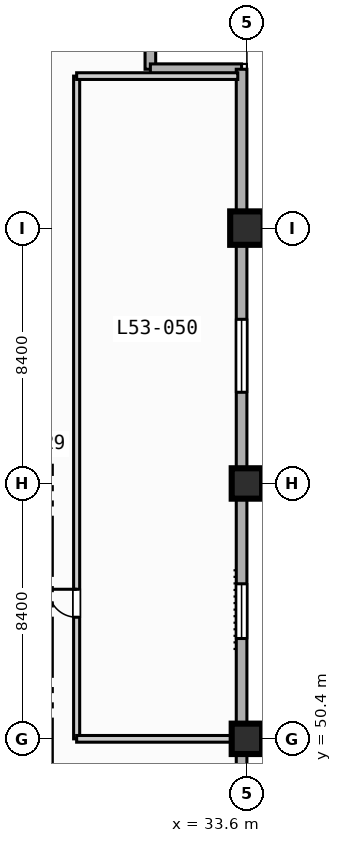
"""IFC4 building model, lengths in metres.
Left out: names, types, materials, properties, quantities, classifications, styles, units other than length and angle.
Written with IfcOpenShell. Run it as: python <this file> out.ifc"""

import sys

from ifc_helpers import new_model, si_unit, direction, frame, frame_2d, origin, origin_2d, place, context, subcontext, project, spatial, rectangle, extrude, element, fill, save


model = new_model("IFC4")
c1 = context("Model", 3, precision=1e-05, world=origin(), true_north=direction((0.0, 1.0)))
c2 = subcontext(c1, "Body", "Model", "MODEL_VIEW")
j1 = project(units=[si_unit("LENGTHUNIT", "METRE"), si_unit("PLANEANGLEUNIT", "RADIAN")], contexts=[c1])
p1 = place(None, origin())
s1 = spatial("IfcSite", under=j1, at=p1, CompositionType="ELEMENT")
p2 = place(p1, origin())
s2 = spatial("IfcBuilding", under=s1, at=p2, CompositionType="ELEMENT")
p3 = place(p2, frame((0.0, 0.0, 216.1)))
s3 = spatial("IfcBuildingStorey", under=s2, at=p3, CompositionType="ELEMENT", Elevation=216.1)
for number, where, z_axis, x_axis in (
    (1, (33.6, 50.4, 0.0), (0.0, 0.0, 1.0), (1.0, 0.0, 0.0)),
    (2, (33.6, 58.8, 0.0), (0.0, 0.0, 1.0), (1.0, 0.0, 0.0)),
):
    element("IfcColumn", number, at=place(p3, frame(where, z_axis=z_axis, x_axis=x_axis)), inside=s3, PredefinedType="COLUMN", context=c2, shape_type="SweptSolid", body=[
        extrude(rectangle(XDim=1.0, YDim=1.0, at=origin_2d()), origin(), (0.0, 0.0, 1.0), 3.7),
    ])
p4 = place(p3, frame((33.6, 67.2, 0.0), z_axis=(0.0, 0.0, 1.0), x_axis=(1.0, 0.0, 0.0)))
e3 = element("IfcColumn", 3, at=p4, inside=s3, PredefinedType="COLUMN", context=c2, shape_type="SweptSolid", body=[
    extrude(rectangle(XDim=1.1, YDim=1.1, at=origin_2d()), origin(), (0.0, 0.0, 1.0), 3.7),
])
for number, where, z_axis, x_axis in (
    (4, (30.425, 75.425, 0.0), (0.0, 0.0, 1.0), (0.0, -1.0, 0.0)),
    (5, (30.425, 72.425, 0.0), (0.0, 0.0, 1.0), (1.0, 0.0, 0.0)),
):
    element("IfcWall", number, at=place(p3, frame(where, z_axis=z_axis, x_axis=x_axis)), inside=s3, PredefinedType="STANDARD", context=c2, shape_type="SweptSolid", body=[
        extrude(rectangle(XDim=3.0, YDim=0.35, at=frame_2d((1.5, 0.0))), origin(), (0.0, 0.0, 1.0), 3.47),
    ])
p5 = place(p3, frame((33.425, 72.425, 0.0), z_axis=(0.0, 0.0, 1.0), x_axis=(0.0, -1.0, 0.0)))
e6 = element("IfcWall", 6, at=p5, inside=s3, PredefinedType="STANDARD", context=c2, shape_type="SweptSolid", body=[
    extrude(rectangle(XDim=39.0, YDim=0.35, at=frame_2d((19.5, 0.0))), origin(), (0.0, 0.0, 1.0), 3.47),
])
p6 = place(p5, frame((33.725, 0.0, 0.85)))
e7 = element("IfcOpeningElement", 7, at=p6, cuts=e6, PredefinedType="OPENING", context=c2, shape_type="SweptSolid", body=[
    extrude(rectangle(XDim=1.8, YDim=1.8, at=frame_2d((0.9, 0.9))), frame((0.0, 0.185, 0.0), z_axis=(0.0, -1.0, 0.0), x_axis=(1.0, 0.0, 0.0)), (0.0, 0.0, 1.0), 0.37),
])
p7 = place(p5, frame((16.925, 0.0, 0.85)))
e8 = element("IfcOpeningElement", 8, at=p7, cuts=e6, PredefinedType="OPENING", context=c2, shape_type="SweptSolid", body=[
    extrude(rectangle(XDim=1.8, YDim=1.8, at=frame_2d((0.9, 0.9))), frame((0.0, 0.185, 0.0), z_axis=(0.0, -1.0, 0.0), x_axis=(1.0, 0.0, 0.0)), (0.0, 0.0, 1.0), 0.37),
])
p8 = place(p5, frame((8.225, 0.0, 0.85)))
e9 = element("IfcOpeningElement", 9, at=p8, cuts=e6, PredefinedType="OPENING", context=c2, shape_type="SweptSolid", body=[
    extrude(rectangle(XDim=2.4, YDim=1.95, at=frame_2d((1.2, 0.975))), frame((0.0, 0.185, 0.0), z_axis=(0.0, -1.0, 0.0), x_axis=(1.0, 0.0, 0.0)), (0.0, 0.0, 1.0), 0.37),
])
p9 = place(p3, frame((28.0, 50.4, 0.0), z_axis=(0.0, 0.0, 1.0), x_axis=(0.0, 1.0, 0.0)))
e10 = element("IfcWall", 10, at=p9, inside=s3, PredefinedType="PARTITIONING", context=c2, shape_type="SweptSolid", body=[
    extrude(rectangle(XDim=21.8, YDim=0.2, at=frame_2d((10.9, 0.0))), origin(), (0.0, 0.0, 1.0), 3.47),
])
p10 = place(p9, frame((4.0, 0.0, 0.0)))
e11 = element("IfcOpeningElement", 11, at=p10, cuts=e10, PredefinedType="OPENING", context=c2, shape_type="SweptSolid", body=[
    extrude(rectangle(XDim=0.92, YDim=2.1, at=frame_2d((0.46, 1.05))), frame((0.0, 0.11, 0.0), z_axis=(0.0, -1.0, 0.0), x_axis=(1.0, 0.0, 0.0)), (0.0, 0.0, 1.0), 0.22),
])
p11 = place(p3, frame((28.0, 50.4, 0.0), z_axis=(0.0, 0.0, 1.0), x_axis=(1.0, 0.0, 0.0)))
e12 = element("IfcWall", 12, at=p11, inside=s3, PredefinedType="PARTITIONING", context=c2, shape_type="SweptSolid", body=[
    extrude(rectangle(XDim=5.3, YDim=0.22, at=frame_2d((2.65, 0.0))), origin(), (0.0, 0.0, 1.0), 2.82),
])
p12 = place(p3, frame((28.0, 72.2, 0.0), z_axis=(0.0, 0.0, 1.0), x_axis=(1.0, 0.0, 0.0)))
e13 = element("IfcWall", 13, at=p12, inside=s3, PredefinedType="PARTITIONING", context=c2, shape_type="SweptSolid", body=[
    extrude(rectangle(XDim=5.3, YDim=0.22, at=frame_2d((2.65, 0.0))), origin(), (0.0, 0.0, 1.0), 3.47),
])
p13 = place(p7, origin())
e14 = element("IfcWindow", 14, at=p13, inside=s3, PartitioningType="SINGLE_PANEL", PredefinedType="WINDOW", context=c2, shape_type="SweptSolid", body=[
    extrude(rectangle(XDim=1.8, YDim=1.8, at=frame_2d((0.9, 0.9))), frame((0.0, 0.03, 0.0), z_axis=(0.0, -1.0, 0.0), x_axis=(1.0, 0.0, 0.0)), (0.0, 0.0, 1.0), 0.06),
])
fill(e8, e14)
p14 = place(p8, origin())
e15 = element("IfcWindow", 15, at=p14, inside=s3, PartitioningType="SINGLE_PANEL", PredefinedType="WINDOW", context=c2, shape_type="SweptSolid", body=[
    extrude(rectangle(XDim=2.4, YDim=1.95, at=frame_2d((1.2, 0.975))), frame((0.0, 0.03, 0.0), z_axis=(0.0, -1.0, 0.0), x_axis=(1.0, 0.0, 0.0)), (0.0, 0.0, 1.0), 0.06),
])
fill(e9, e15)
p15 = place(p10, origin())
e16 = element("IfcDoor", 16, at=p15, inside=s3, OperationType="SINGLE_SWING_RIGHT", PredefinedType="DOOR", context=c2, shape_type="SweptSolid", body=[
    extrude(rectangle(XDim=0.92, YDim=2.1, at=frame_2d((0.46, 1.05))), frame((0.0, 0.025, 0.0), z_axis=(0.0, -1.0, 0.0), x_axis=(1.0, 0.0, 0.0)), (0.0, 0.0, 1.0), 0.05),
])
fill(e11, e16)
save(model, sys.argv[1])
